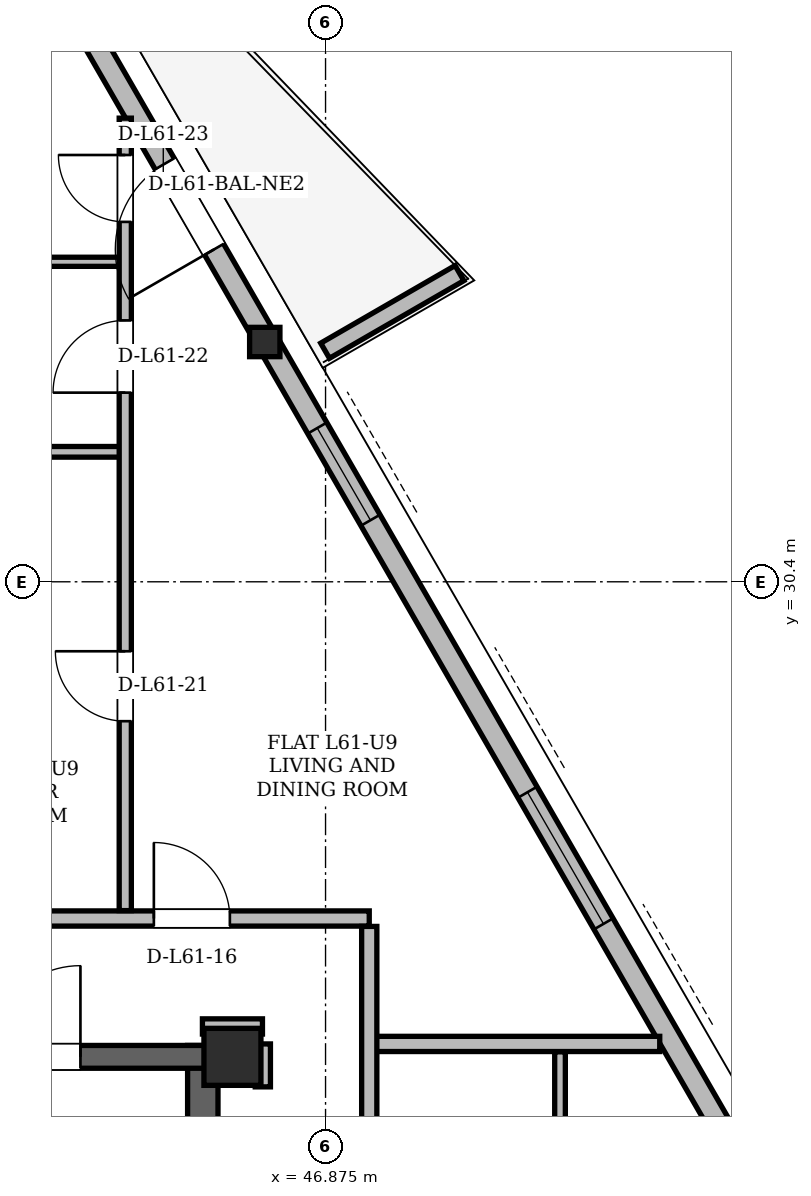
"""IFC4 building model, lengths in metres.
Left out: names, types, materials, properties, quantities, classifications, styles, units other than length and angle.
Written with IfcOpenShell. Run it as: python <this file> out.ifc"""

import sys

from ifc_helpers import new_model, si_unit, direction, frame, frame_2d, origin, origin_2d, place, context, subcontext, project, spatial, polyline, rectangle, hollow_rectangle, i_section, outline, extrude, element, fill, save


model = new_model("IFC4")
c1 = context("Model", 3, precision=1e-05, world=origin(), true_north=direction((0.0, 1.0)))
c2 = subcontext(c1, "Body", "Model", "MODEL_VIEW")
j1 = project(units=[si_unit("LENGTHUNIT", "METRE"), si_unit("PLANEANGLEUNIT", "RADIAN")], contexts=[c1])
p1 = place(None, origin())
s1 = spatial("IfcSite", under=j1, at=p1, CompositionType="ELEMENT")
p2 = place(p1, origin())
s2 = spatial("IfcBuilding", under=s1, at=p2, CompositionType="ELEMENT")
p3 = place(p2, frame((0.0, 0.0, 230.7)))
s3 = spatial("IfcBuildingStorey", under=s2, at=p3, CompositionType="ELEMENT", Elevation=230.7)
p4 = place(p3, frame((45.65, 24.15, 0.0), z_axis=(0.0, 0.0, 1.0), x_axis=(1.0, 0.0, 0.0)))
e1 = element("IfcColumn", 1, at=p4, inside=s3, PredefinedType="COLUMN", context=c2, shape_type="SweptSolid", body=[
    extrude(hollow_rectangle(XDim=0.75, YDim=0.75, WallThickness=0.06, at=origin_2d()), origin(), (0.0, 0.0, 1.0), 3.6),
])
p5 = place(p3, frame((46.106, 33.566, 0.005), z_axis=(-0.016926783589, -0.006458009803, 0.999835875585), x_axis=(0.356463384925, -0.934309293119, 0.0)))
e2 = element("IfcColumn", 2, at=p5, inside=s3, PredefinedType="COLUMN", context=c2, shape_type="SweptSolid", body=[
    extrude(i_section(OverallWidth=0.399, OverallDepth=0.386, WebThickness=0.021, FlangeThickness=0.033, at=origin_2d()), origin(), (0.0, 0.0, 1.0), 3.591),
])
p6 = place(p3, frame((45.26, 11.0, 0.0), z_axis=(0.0, 0.0, 1.0), x_axis=(0.0, 1.0, 0.0)))
e3 = element("IfcWall", 3, at=p6, inside=s3, PredefinedType="SHEAR", context=c2, shape_type="SweptSolid", body=[
    extrude(rectangle(XDim=13.3, YDim=0.4, at=frame_2d((6.65, 0.0))), origin(), (0.0, 0.0, 1.0), 3.38),
])
p7 = place(p3, frame((29.65, 24.15, 0.0), z_axis=(0.0, 0.0, 1.0), x_axis=(1.0, 0.0, 0.0)))
e4 = element("IfcWall", 4, at=p7, inside=s3, PredefinedType="SHEAR", context=c2, shape_type="SweptSolid", body=[
    extrude(rectangle(XDim=15.7, YDim=0.3, at=frame_2d((7.85, 0.0))), origin(), (0.0, 0.0, 1.0), 3.38),
])
p8 = place(p7, frame((1.7, 0.0, 0.0)))
e5 = element("IfcOpeningElement", 5, at=p8, cuts=e4, PredefinedType="OPENING", context=c2, shape_type="SweptSolid", body=[
    extrude(rectangle(XDim=1.2, YDim=2.2, at=frame_2d((0.6, 1.1))), frame((0.0, 0.15, 0.0), z_axis=(0.0, -1.0, 0.0), x_axis=(1.0, 0.0, 0.0)), (0.0, 0.0, 1.0), 0.3),
])
p9 = place(p7, frame((12.8, 0.0, 0.0)))
e6 = element("IfcOpeningElement", 6, at=p9, cuts=e4, PredefinedType="OPENING", context=c2, shape_type="SweptSolid", body=[
    extrude(rectangle(XDim=1.2, YDim=2.2, at=frame_2d((0.6, 1.1))), frame((0.0, 0.15, 0.0), z_axis=(0.0, -1.0, 0.0), x_axis=(1.0, 0.0, 0.0)), (0.0, 0.0, 1.0), 0.3),
])
p10 = place(p7, frame((6.55, 0.0, 0.0)))
e7 = element("IfcOpeningElement", 7, at=p10, cuts=e4, PredefinedType="OPENING", context=c2, shape_type="SweptSolid", body=[
    extrude(rectangle(XDim=0.9, YDim=2.05, at=frame_2d((0.45, 1.025))), frame((0.0, 0.15, 0.0), z_axis=(0.0, -1.0, 0.0), x_axis=(1.0, 0.0, 0.0)), (0.0, 0.0, 1.0), 0.3),
])
p11 = place(p7, frame((8.45, 0.0, 0.0)))
e8 = element("IfcOpeningElement", 8, at=p11, cuts=e4, PredefinedType="OPENING", context=c2, shape_type="SweptSolid", body=[
    extrude(rectangle(XDim=0.9, YDim=2.05, at=frame_2d((0.45, 1.025))), frame((0.0, 0.15, 0.0), z_axis=(0.0, -1.0, 0.0), x_axis=(1.0, 0.0, 0.0)), (0.0, 0.0, 1.0), 0.3),
])
p12 = place(p3, frame((58.984, 11.26, 0.0), z_axis=(0.0, 0.0, 1.0), x_axis=(-0.50000331183, 0.86602349169, 0.0)))
e9 = element("IfcWall", 9, at=p12, inside=s3, PredefinedType="SOLIDWALL", context=c2, shape_type="SweptSolid", body=[
    extrude(rectangle(XDim=36.795, YDim=0.29, at=frame_2d((18.397, 0.0))), origin(), (0.0, 0.0, 1.0), 2.677),
])
p13 = place(p12, frame((3.219, 0.0, 0.0)))
e10 = element("IfcOpeningElement", 10, at=p13, cuts=e9, PredefinedType="OPENING", context=c2, shape_type="SweptSolid", body=[
    extrude(rectangle(XDim=1.5, YDim=2.2, at=frame_2d((0.75, 1.1))), frame((0.0, 0.145, 0.0), z_axis=(0.0, -1.0, 0.0), x_axis=(1.0, 0.0, 0.0)), (0.0, 0.0, 1.0), 0.29),
])
p14 = place(p12, frame((27.151, 0.0, 0.0)))
e11 = element("IfcOpeningElement", 11, at=p14, cuts=e9, PredefinedType="OPENING", context=c2, shape_type="SweptSolid", body=[
    extrude(rectangle(XDim=1.3, YDim=2.2, at=frame_2d((0.65, 1.1))), frame((0.0, 0.145, 0.0), z_axis=(0.0, -1.0, 0.0), x_axis=(1.0, 0.0, 0.0)), (0.0, 0.0, 1.0), 0.29),
])
p15 = place(p12, frame((1.169, 0.0, 0.85)))
e12 = element("IfcOpeningElement", 12, at=p15, cuts=e9, PredefinedType="OPENING", context=c2, shape_type="SweptSolid", body=[
    extrude(rectangle(XDim=1.2, YDim=1.48, at=frame_2d((0.6, 0.74))), frame((0.0, 0.145, 0.0), z_axis=(0.0, -1.0, 0.0), x_axis=(1.0, 0.0, 0.0)), (0.0, 0.0, 1.0), 0.29),
])
p16 = place(p12, frame((7.888, 0.0, 0.85)))
e13 = element("IfcOpeningElement", 13, at=p16, cuts=e9, PredefinedType="OPENING", context=c2, shape_type="SweptSolid", body=[
    extrude(rectangle(XDim=1.2, YDim=1.48, at=frame_2d((0.6, 0.74))), frame((0.0, 0.145, 0.0), z_axis=(0.0, -1.0, 0.0), x_axis=(1.0, 0.0, 0.0)), (0.0, 0.0, 1.0), 0.29),
])
p17 = place(p12, frame((32.464, 0.0, 0.85)))
e14 = element("IfcOpeningElement", 14, at=p17, cuts=e9, PredefinedType="OPENING", context=c2, shape_type="SweptSolid", body=[
    extrude(rectangle(XDim=1.2, YDim=1.48, at=frame_2d((0.6, 0.74))), frame((0.0, 0.145, 0.0), z_axis=(0.0, -1.0, 0.0), x_axis=(1.0, 0.0, 0.0)), (0.0, 0.0, 1.0), 0.29),
])
p18 = place(p12, frame((16.904, 0.0, 0.85)))
e15 = element("IfcOpeningElement", 15, at=p18, cuts=e9, PredefinedType="OPENING", context=c2, shape_type="SweptSolid", body=[
    extrude(rectangle(XDim=2.0, YDim=1.717, at=frame_2d((1.0, 0.858))), frame((0.0, 0.145, 0.0), z_axis=(0.0, -1.0, 0.0), x_axis=(1.0, 0.0, 0.0)), (0.0, 0.0, 1.0), 0.29),
])
p19 = place(p12, frame((23.036, 0.0, 0.85)))
e16 = element("IfcOpeningElement", 16, at=p19, cuts=e9, PredefinedType="OPENING", context=c2, shape_type="SweptSolid", body=[
    extrude(rectangle(XDim=1.4, YDim=1.6, at=frame_2d((0.7, 0.8))), frame((0.0, 0.145, 0.0), z_axis=(0.0, -1.0, 0.0), x_axis=(1.0, 0.0, 0.0)), (0.0, 0.0, 1.0), 0.29),
])
p20 = place(p3, frame((46.869, 33.44, 0.0), z_axis=(0.0, 0.0, 1.0), x_axis=(0.866012356593, 0.500022597718, 0.0)))
e17 = element("IfcWall", 17, at=p20, inside=s3, PredefinedType="PARAPET", context=c2, shape_type="SweptSolid", body=[
    extrude(outline(polyline([(0.0, 0.0), (2.042, 0.0), (2.042, 1.1), (0.0, 1.32), (0.0, 0.0)])), frame((0.0, 0.115, 0.0), z_axis=(0.0, -1.0, 0.0), x_axis=(1.0, 0.0, 0.0)), (0.0, 0.0, 1.0), 0.23),
])
p21 = place(p3, frame((47.45, 24.32, 0.0), z_axis=(0.0, 0.0, 1.0), x_axis=(1.0, 0.0, 0.0)))
e18 = element("IfcWall", 18, at=p21, inside=s3, PredefinedType="PARTITIONING", context=c2, shape_type="SweptSolid", body=[
    extrude(rectangle(XDim=3.822, YDim=0.2, at=frame_2d((1.911, 0.0))), origin(), (0.0, 0.0, 1.0), 3.38),
])
p22 = place(p3, frame((45.255, 24.55, 0.0), z_axis=(0.0, 0.0, 1.0), x_axis=(1.0, 0.0, 0.0)))
e19 = element("IfcWall", 19, at=p22, inside=s3, PredefinedType="PARTITIONING", context=c2, shape_type="SweptSolid", body=[
    extrude(rectangle(XDim=0.79, YDim=0.2, at=frame_2d((0.395, 0.0))), origin(), (0.0, 0.0, 1.0), 2.913),
])
p23 = place(p3, frame((25.6, 25.97, 0.0), z_axis=(0.0, 0.0, 1.0), x_axis=(1.0, 0.0, 0.0)))
e20 = element("IfcWall", 20, at=p23, inside=s3, PredefinedType="PARTITIONING", context=c2, shape_type="SweptSolid", body=[
    extrude(rectangle(XDim=21.85, YDim=0.2, at=frame_2d((10.925, 0.0))), origin(), (0.0, 0.0, 1.0), 2.913),
])
p24 = place(p23, frame((3.841, 0.0, 0.0)))
e21 = element("IfcOpeningElement", 21, at=p24, cuts=e20, PredefinedType="OPENING", context=c2, shape_type="SweptSolid", body=[
    extrude(rectangle(XDim=1.0, YDim=2.18, at=frame_2d((0.5, 1.09))), frame((0.0, 0.1, 0.0), z_axis=(0.0, -1.0, 0.0), x_axis=(1.0, 0.0, 0.0)), (0.0, 0.0, 1.0), 0.2),
])
p25 = place(p23, frame((9.75, 0.0, 0.0)))
e22 = element("IfcOpeningElement", 22, at=p25, cuts=e20, PredefinedType="OPENING", context=c2, shape_type="SweptSolid", body=[
    extrude(rectangle(XDim=1.3, YDim=2.2, at=frame_2d((0.65, 1.1))), frame((0.0, 0.1, 0.0), z_axis=(0.0, -1.0, 0.0), x_axis=(1.0, 0.0, 0.0)), (0.0, 0.0, 1.0), 0.2),
])
p26 = place(p23, frame((13.777, 0.0, 0.0)))
e23 = element("IfcOpeningElement", 23, at=p26, cuts=e20, PredefinedType="OPENING", context=c2, shape_type="SweptSolid", body=[
    extrude(rectangle(XDim=1.0, YDim=2.18, at=frame_2d((0.5, 1.09))), frame((0.0, 0.1, 0.0), z_axis=(0.0, -1.0, 0.0), x_axis=(1.0, 0.0, 0.0)), (0.0, 0.0, 1.0), 0.2),
])
p27 = place(p23, frame((19.016, 0.0, 0.0)))
e24 = element("IfcOpeningElement", 24, at=p27, cuts=e20, PredefinedType="OPENING", context=c2, shape_type="SweptSolid", body=[
    extrude(rectangle(XDim=1.0, YDim=2.18, at=frame_2d((0.5, 1.09))), frame((0.0, 0.1, 0.0), z_axis=(0.0, -1.0, 0.0), x_axis=(1.0, 0.0, 0.0)), (0.0, 0.0, 1.0), 0.2),
])
p28 = place(p3, frame((41.45, 32.11, 0.0), z_axis=(0.0, 0.0, 1.0), x_axis=(1.0, 0.0, 0.0)))
e25 = element("IfcWall", 25, at=p28, inside=s3, PredefinedType="PARTITIONING", context=c2, shape_type="SweptSolid", body=[
    extrude(rectangle(XDim=2.786, YDim=0.14, at=frame_2d((1.393, 0.0))), origin(), (0.0, 0.0, 1.0), 2.913),
])
p29 = place(p3, frame((41.45, 34.61, 0.0), z_axis=(0.0, 0.0, 1.0), x_axis=(1.0, 0.0, 0.0)))
e26 = element("IfcWall", 26, at=p29, inside=s3, PredefinedType="PARTITIONING", context=c2, shape_type="SweptSolid", body=[
    extrude(rectangle(XDim=2.786, YDim=0.12, at=frame_2d((1.393, 0.0))), origin(), (0.0, 0.0, 1.0), 2.913),
])
p30 = place(p3, frame((44.24, 26.074, 0.0), z_axis=(0.0, 0.0, 1.0), x_axis=(0.0, 1.0, 0.0)))
e27 = element("IfcWall", 27, at=p30, inside=s3, PredefinedType="PARTITIONING", context=c2, shape_type="SweptSolid", body=[
    extrude(rectangle(XDim=10.426, YDim=0.16, at=frame_2d((5.213, 0.0))), origin(), (0.0, 0.0, 1.0), 2.913),
])
p31 = place(p30, frame((2.492, 0.0, 0.0)))
e28 = element("IfcOpeningElement", 28, at=p31, cuts=e27, PredefinedType="OPENING", context=c2, shape_type="SweptSolid", body=[
    extrude(rectangle(XDim=0.92, YDim=2.12, at=frame_2d((0.46, 1.06))), frame((0.0, 0.08, 0.0), z_axis=(0.0, -1.0, 0.0), x_axis=(1.0, 0.0, 0.0)), (0.0, 0.0, 1.0), 0.16),
])
p32 = place(p30, frame((6.814, 0.0, 0.0)))
e29 = element("IfcOpeningElement", 29, at=p32, cuts=e27, PredefinedType="OPENING", context=c2, shape_type="SweptSolid", body=[
    extrude(rectangle(XDim=0.95, YDim=2.1, at=frame_2d((0.475, 1.05))), frame((0.0, 0.08, 0.0), z_axis=(0.0, -1.0, 0.0), x_axis=(1.0, 0.0, 0.0)), (0.0, 0.0, 1.0), 0.16),
])
p33 = place(p30, frame((9.061, 0.0, 0.0)))
e30 = element("IfcOpeningElement", 30, at=p33, cuts=e27, PredefinedType="OPENING", context=c2, shape_type="SweptSolid", body=[
    extrude(rectangle(XDim=0.88, YDim=2.08, at=frame_2d((0.44, 1.04))), frame((0.0, 0.08, 0.0), z_axis=(0.0, -1.0, 0.0), x_axis=(1.0, 0.0, 0.0)), (0.0, 0.0, 1.0), 0.16),
])
p34 = place(p3, frame((46.05, 23.755, 0.0), z_axis=(0.0, 0.0, 1.0), x_axis=(0.0, 1.0, 0.0)))
e31 = element("IfcWall", 31, at=p34, inside=s3, PredefinedType="PARTITIONING", context=c2, shape_type="SweptSolid", body=[
    extrude(rectangle(XDim=0.565, YDim=0.2, at=frame_2d((0.283, 0.0))), origin(), (0.0, 0.0, 1.0), 3.38),
])
p35 = place(p3, frame((47.45, 9.404, 0.0), z_axis=(0.0, 0.0, 1.0), x_axis=(0.0, 1.0, 0.0)))
e32 = element("IfcWall", 32, at=p35, inside=s3, PredefinedType="PARTITIONING", context=c2, shape_type="SweptSolid", body=[
    extrude(rectangle(XDim=16.462, YDim=0.2, at=frame_2d((8.231, 0.0))), origin(), (0.0, 0.0, 1.0), 2.913),
])
p36 = place(p35, frame((3.163, 0.0, 0.0)))
e33 = element("IfcOpeningElement", 33, at=p36, cuts=e32, PredefinedType="OPENING", context=c2, shape_type="SweptSolid", body=[
    extrude(rectangle(XDim=1.0, YDim=2.18, at=frame_2d((0.5, 1.09))), frame((0.0, 0.1, 0.0), z_axis=(0.0, -1.0, 0.0), x_axis=(1.0, 0.0, 0.0)), (0.0, 0.0, 1.0), 0.2),
])
p37 = place(p35, frame((9.778, 0.0, 0.0)))
e34 = element("IfcOpeningElement", 34, at=p37, cuts=e32, PredefinedType="OPENING", context=c2, shape_type="SweptSolid", body=[
    extrude(rectangle(XDim=1.0, YDim=2.18, at=frame_2d((0.5, 1.09))), frame((0.0, 0.1, 0.0), z_axis=(0.0, -1.0, 0.0), x_axis=(1.0, 0.0, 0.0)), (0.0, 0.0, 1.0), 0.2),
])
p38 = place(p3, frame((49.96, 21.914, 0.0), z_axis=(0.0, 0.0, 1.0), x_axis=(0.0, 1.0, 0.0)))
e35 = element("IfcWall", 35, at=p38, inside=s3, PredefinedType="PARTITIONING", context=c2, shape_type="SweptSolid", body=[
    extrude(rectangle(XDim=2.302, YDim=0.14, at=frame_2d((1.151, 0.0))), origin(), (0.0, 0.0, 1.0), 3.38),
])
p39 = place(p14, origin())
e36 = element("IfcDoor", 36, at=p39, inside=s3, OperationType="SINGLE_SWING_LEFT", PredefinedType="DOOR", context=c2, shape_type="SweptSolid", body=[
    extrude(rectangle(XDim=1.3, YDim=2.2, at=frame_2d((0.65, 1.1))), frame((0.0, 0.025, 0.0), z_axis=(0.0, -1.0, 0.0), x_axis=(1.0, 0.0, 0.0)), (0.0, 0.0, 1.0), 0.05),
])
fill(e11, e36)
p40 = place(p18, origin())
e37 = element("IfcWindow", 37, at=p40, inside=s3, PartitioningType="SINGLE_PANEL", PredefinedType="WINDOW", context=c2, shape_type="SweptSolid", body=[
    extrude(rectangle(XDim=2.0, YDim=1.717, at=frame_2d((1.0, 0.858))), frame((0.0, 0.03, 0.0), z_axis=(0.0, -1.0, 0.0), x_axis=(1.0, 0.0, 0.0)), (0.0, 0.0, 1.0), 0.06),
])
fill(e15, e37)
p41 = place(p19, origin())
e38 = element("IfcWindow", 38, at=p41, inside=s3, PartitioningType="SINGLE_PANEL", PredefinedType="WINDOW", context=c2, shape_type="SweptSolid", body=[
    extrude(rectangle(XDim=1.4, YDim=1.6, at=frame_2d((0.7, 0.8))), frame((0.0, 0.03, 0.0), z_axis=(0.0, -1.0, 0.0), x_axis=(1.0, 0.0, 0.0)), (0.0, 0.0, 1.0), 0.06),
])
fill(e16, e38)
p42 = place(p9, origin())
e39 = element("IfcDoor", 39, at=p42, inside=s3, OperationType="SINGLE_SWING_RIGHT", PredefinedType="DOOR", context=c2, shape_type="SweptSolid", body=[
    extrude(rectangle(XDim=1.2, YDim=2.2, at=frame_2d((0.6, 1.1))), frame((0.0, 0.025, 0.0), z_axis=(0.0, -1.0, 0.0), x_axis=(1.0, 0.0, 0.0)), (0.0, 0.0, 1.0), 0.05),
])
fill(e6, e39)
p43 = place(p27, origin())
e40 = element("IfcDoor", 40, at=p43, inside=s3, OperationType="SINGLE_SWING_LEFT", PredefinedType="DOOR", context=c2, shape_type="SweptSolid", body=[
    extrude(rectangle(XDim=1.0, YDim=2.18, at=frame_2d((0.5, 1.09))), frame((0.0, 0.025, 0.0), z_axis=(0.0, -1.0, 0.0), x_axis=(1.0, 0.0, 0.0)), (0.0, 0.0, 1.0), 0.05),
])
fill(e24, e40)
p44 = place(p31, origin())
e41 = element("IfcDoor", 41, at=p44, inside=s3, OperationType="SINGLE_SWING_RIGHT", PredefinedType="DOOR", context=c2, shape_type="SweptSolid", body=[
    extrude(rectangle(XDim=0.92, YDim=2.12, at=frame_2d((0.46, 1.06))), frame((0.0, 0.025, 0.0), z_axis=(0.0, -1.0, 0.0), x_axis=(1.0, 0.0, 0.0)), (0.0, 0.0, 1.0), 0.05),
])
fill(e28, e41)
p45 = place(p32, origin())
e42 = element("IfcDoor", 42, at=p45, inside=s3, OperationType="SINGLE_SWING_LEFT", PredefinedType="DOOR", context=c2, shape_type="SweptSolid", body=[
    extrude(rectangle(XDim=0.95, YDim=2.1, at=frame_2d((0.475, 1.05))), frame((0.0, 0.025, 0.0), z_axis=(0.0, -1.0, 0.0), x_axis=(1.0, 0.0, 0.0)), (0.0, 0.0, 1.0), 0.05),
])
fill(e29, e42)
p46 = place(p33, origin())
e43 = element("IfcDoor", 43, at=p46, inside=s3, OperationType="SINGLE_SWING_RIGHT", PredefinedType="DOOR", context=c2, shape_type="SweptSolid", body=[
    extrude(rectangle(XDim=0.88, YDim=2.08, at=frame_2d((0.44, 1.04))), frame((0.0, 0.025, 0.0), z_axis=(0.0, -1.0, 0.0), x_axis=(1.0, 0.0, 0.0)), (0.0, 0.0, 1.0), 0.05),
])
fill(e30, e43)
save(model, sys.argv[1])
